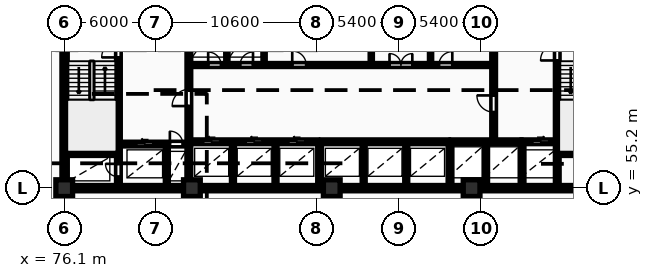
"""IFC4 building model, lengths in metres.
Left out: names, types, materials, properties, quantities, classifications, styles, units other than length and angle.
Written with IfcOpenShell. Run it as: python <this file> out.ifc"""

import sys

from ifc_helpers import new_model, si_unit, direction, frame, frame_2d, origin, origin_2d, place, context, subcontext, project, spatial, rectangle, extrude, element, fill, save


model = new_model("IFC4")
c1 = context("Model", 3, precision=1e-05, world=origin(), true_north=direction((0.0, 1.0)))
c2 = subcontext(c1, "Body", "Model", "MODEL_VIEW")
j1 = project(units=[si_unit("LENGTHUNIT", "METRE"), si_unit("PLANEANGLEUNIT", "RADIAN")], contexts=[c1])
p1 = place(None, origin())
s1 = spatial("IfcSite", under=j1, at=p1, CompositionType="ELEMENT")
p2 = place(p1, origin())
s2 = spatial("IfcBuilding", under=s1, at=p2, CompositionType="ELEMENT")
p3 = place(p2, frame((0.0, 0.0, -3.6)))
s3 = spatial("IfcBuildingStorey", under=s2, at=p3, CompositionType="ELEMENT", Elevation=-3.6)
for number, where, z_axis, x_axis in (
    (1, (76.1, 55.2, 0.0), (0.0, 0.0, 1.0), (1.0, 0.0, 0.0)),
    (2, (84.5, 55.2, 0.0), (0.0, 0.0, 1.0), (1.0, 0.0, 0.0)),
    (3, (93.7, 55.2, 0.0), (0.0, 0.0, 1.0), (1.0, 0.0, 0.0)),
    (4, (102.9, 55.2, 0.0), (0.0, 0.0, 1.0), (1.0, 0.0, 0.0)),
):
    element("IfcColumn", number, at=place(p3, frame(where, z_axis=z_axis, x_axis=x_axis)), inside=s3, PredefinedType="COLUMN", context=c2, shape_type="SweptSolid", body=[
        extrude(rectangle(XDim=1.1, YDim=1.1, at=origin_2d()), origin(), (0.0, 0.0, 1.0), 3.6),
    ])
p4 = place(p3, frame((75.95, 55.2, 0.0), z_axis=(0.0, 0.0, 1.0), x_axis=(1.0, 0.0, 0.0)))
e5 = element("IfcWall", 5, at=p4, inside=s3, PredefinedType="SHEAR", context=c2, shape_type="SweptSolid", body=[
    extrude(rectangle(XDim=36.3, YDim=0.35, at=frame_2d((18.15, 0.0))), origin(), (0.0, 0.0, 1.0), 3.6),
])
p5 = place(p3, frame((76.125, 55.375, 0.0), z_axis=(0.0, 0.0, 1.0), x_axis=(0.0, 1.0, 0.0)))
e6 = element("IfcWall", 6, at=p5, inside=s3, PredefinedType="SHEAR", context=c2, shape_type="SweptSolid", body=[
    extrude(rectangle(XDim=11.65, YDim=0.35, at=frame_2d((5.825, 0.0))), origin(), (0.0, 0.0, 1.0), 3.6),
])
p6 = place(p3, frame((79.665, 55.4, 0.0), z_axis=(0.0, 0.0, 1.0), x_axis=(0.0, 1.0, 0.0)))
e7 = element("IfcWall", 7, at=p6, inside=s3, PredefinedType="SHEAR", context=c2, shape_type="SweptSolid", body=[
    extrude(rectangle(XDim=11.6, YDim=0.25, at=frame_2d((5.8, 0.0))), origin(), (0.0, 0.0, 1.0), 3.6),
])
p7 = place(p6, frame((0.55, 0.0, 0.0)))
e8 = element("IfcOpeningElement", 8, at=p7, cuts=e7, PredefinedType="OPENING", context=c2, shape_type="SweptSolid", body=[
    extrude(rectangle(XDim=0.85, YDim=2.05, at=frame_2d((0.425, 1.025))), frame((0.0, 0.135, 0.0), z_axis=(0.0, -1.0, 0.0), x_axis=(1.0, 0.0, 0.0)), (0.0, 0.0, 1.0), 0.27),
])
p8 = place(p6, frame((8.4, 0.0, 0.0)))
e9 = element("IfcOpeningElement", 9, at=p8, cuts=e7, PredefinedType="OPENING", context=c2, shape_type="SweptSolid", body=[
    extrude(rectangle(XDim=1.1, YDim=2.1, at=frame_2d((0.55, 1.05))), frame((0.0, 0.135, 0.0), z_axis=(0.0, -1.0, 0.0), x_axis=(1.0, 0.0, 0.0)), (0.0, 0.0, 1.0), 0.27),
])
p9 = place(p6, frame((10.25, 0.0, 0.0)))
e10 = element("IfcOpeningElement", 10, at=p9, cuts=e7, PredefinedType="OPENING", context=c2, shape_type="SweptSolid", body=[
    extrude(rectangle(XDim=0.85, YDim=2.05, at=frame_2d((0.425, 1.025))), frame((0.0, 0.135, 0.0), z_axis=(0.0, -1.0, 0.0), x_axis=(1.0, 0.0, 0.0)), (0.0, 0.0, 1.0), 0.27),
])
p10 = place(p3, frame((76.3, 57.475, 0.0), z_axis=(0.0, 0.0, 1.0), x_axis=(1.0, 0.0, 0.0)))
e11 = element("IfcWall", 11, at=p10, inside=s3, PredefinedType="SHEAR", context=c2, shape_type="SweptSolid", body=[
    extrude(rectangle(XDim=3.24, YDim=0.25, at=frame_2d((1.62, 0.0))), origin(), (0.0, 0.0, 1.0), 3.6),
])
p11 = place(p3, frame((79.79, 58.1, 0.0), z_axis=(0.0, 0.0, 1.0), x_axis=(1.0, 0.0, 0.0)))
e12 = element("IfcWall", 12, at=p11, inside=s3, PredefinedType="SHEAR", context=c2, shape_type="SweptSolid", body=[
    extrude(rectangle(XDim=4.39, YDim=0.25, at=frame_2d((2.195, 0.0))), origin(), (0.0, 0.0, 1.0), 3.6),
])
p12 = place(p11, frame((1.05, 0.0, 0.0)))
e13 = element("IfcOpeningElement", 13, at=p12, cuts=e12, PredefinedType="OPENING", context=c2, shape_type="SweptSolid", body=[
    extrude(rectangle(XDim=1.12, YDim=2.12, at=frame_2d((0.56, 1.06))), frame((0.0, 0.135, 0.0), z_axis=(0.0, -1.0, 0.0), x_axis=(1.0, 0.0, 0.0)), (0.0, 0.0, 1.0), 0.27),
])
p13 = place(p11, frame((3.26, 0.0, 0.0)))
e14 = element("IfcOpeningElement", 14, at=p13, cuts=e12, PredefinedType="OPENING", context=c2, shape_type="SweptSolid", body=[
    extrude(rectangle(XDim=0.85, YDim=2.05, at=frame_2d((0.425, 1.025))), frame((0.0, 0.135, 0.0), z_axis=(0.0, -1.0, 0.0), x_axis=(1.0, 0.0, 0.0)), (0.0, 0.0, 1.0), 0.27),
])
p14 = place(p3, frame((82.85, 55.4, 0.0), z_axis=(0.0, 0.0, 1.0), x_axis=(0.0, 1.0, 0.0)))
e15 = element("IfcWall", 15, at=p14, inside=s3, PredefinedType="PARTITIONING", context=c2, shape_type="SweptSolid", body=[
    extrude(rectangle(XDim=2.56, YDim=0.2, at=frame_2d((1.28, 0.0))), origin(), (0.0, 0.0, 1.0), 3.3),
])
p15 = place(p3, frame((84.3, 55.4, 0.0), z_axis=(0.0, 0.0, 1.0), x_axis=(0.0, 1.0, 0.0)))
e16 = element("IfcWall", 16, at=p15, inside=s3, PredefinedType="SHEAR", context=c2, shape_type="SweptSolid", body=[
    extrude(rectangle(XDim=11.6, YDim=0.25, at=frame_2d((5.8, 0.0))), origin(), (0.0, 0.0, 1.0), 3.6),
])
p16 = place(p15, frame((5.2, 0.0, 0.0)))
e17 = element("IfcOpeningElement", 17, at=p16, cuts=e16, PredefinedType="OPENING", context=c2, shape_type="SweptSolid", body=[
    extrude(rectangle(XDim=1.1, YDim=2.1, at=frame_2d((0.55, 1.05))), frame((0.0, 0.135, 0.0), z_axis=(0.0, -1.0, 0.0), x_axis=(1.0, 0.0, 0.0)), (0.0, 0.0, 1.0), 0.27),
])
for number, where, z_axis, x_axis in (
    (18, (87.2, 55.4, 0.0), (0.0, 0.0, 1.0), (0.0, 1.0, 0.0)),
    (19, (90.0, 55.4, 0.0), (0.0, 0.0, 1.0), (0.0, 1.0, 0.0)),
):
    element("IfcWall", number, at=place(p3, frame(where, z_axis=z_axis, x_axis=x_axis)), inside=s3, PredefinedType="PARTITIONING", context=c2, shape_type="SweptSolid", body=[
        extrude(rectangle(XDim=2.72, YDim=0.2, at=frame_2d((1.36, 0.0))), origin(), (0.0, 0.0, 1.0), 3.3),
    ])
p17 = place(p3, frame((84.42, 58.25, 0.0), z_axis=(0.0, 0.0, 1.0), x_axis=(1.0, 0.0, 0.0)))
e20 = element("IfcWall", 20, at=p17, inside=s3, PredefinedType="SHEAR", context=c2, shape_type="SweptSolid", body=[
    extrude(rectangle(XDim=8.36, YDim=0.25, at=frame_2d((4.18, 0.0))), origin(), (0.0, 0.0, 1.0), 3.6),
])
p18 = place(p17, frame((0.82, 0.0, 0.0)))
e21 = element("IfcOpeningElement", 21, at=p18, cuts=e20, PredefinedType="OPENING", context=c2, shape_type="SweptSolid", body=[
    extrude(rectangle(XDim=1.12, YDim=2.12, at=frame_2d((0.56, 1.06))), frame((0.0, 0.135, 0.0), z_axis=(0.0, -1.0, 0.0), x_axis=(1.0, 0.0, 0.0)), (0.0, 0.0, 1.0), 0.27),
])
p19 = place(p17, frame((3.62, 0.0, 0.0)))
e22 = element("IfcOpeningElement", 22, at=p19, cuts=e20, PredefinedType="OPENING", context=c2, shape_type="SweptSolid", body=[
    extrude(rectangle(XDim=1.12, YDim=2.12, at=frame_2d((0.56, 1.06))), frame((0.0, 0.135, 0.0), z_axis=(0.0, -1.0, 0.0), x_axis=(1.0, 0.0, 0.0)), (0.0, 0.0, 1.0), 0.27),
])
p20 = place(p17, frame((6.42, 0.0, 0.0)))
e23 = element("IfcOpeningElement", 23, at=p20, cuts=e20, PredefinedType="OPENING", context=c2, shape_type="SweptSolid", body=[
    extrude(rectangle(XDim=1.12, YDim=2.12, at=frame_2d((0.56, 1.06))), frame((0.0, 0.135, 0.0), z_axis=(0.0, -1.0, 0.0), x_axis=(1.0, 0.0, 0.0)), (0.0, 0.0, 1.0), 0.27),
])
p21 = place(p3, frame((92.9, 55.4, 0.0), z_axis=(0.0, 0.0, 1.0), x_axis=(0.0, 1.0, 0.0)))
e24 = element("IfcWall", 24, at=p21, inside=s3, PredefinedType="SHEAR", context=c2, shape_type="SweptSolid", body=[
    extrude(rectangle(XDim=2.85, YDim=0.25, at=frame_2d((1.425, 0.0))), origin(), (0.0, 0.0, 1.0), 3.6),
])
for number, where, z_axis, x_axis in (
    (25, (95.8, 55.4, 0.0), (0.0, 0.0, 1.0), (0.0, 1.0, 0.0)),
    (26, (98.6, 55.4, 0.0), (0.0, 0.0, 1.0), (0.0, 1.0, 0.0)),
):
    element("IfcWall", number, at=place(p3, frame(where, z_axis=z_axis, x_axis=x_axis)), inside=s3, PredefinedType="PARTITIONING", context=c2, shape_type="SweptSolid", body=[
        extrude(rectangle(XDim=2.72, YDim=0.2, at=frame_2d((1.36, 0.0))), origin(), (0.0, 0.0, 1.0), 3.3),
    ])
p22 = place(p3, frame((93.02, 58.25, 0.0), z_axis=(0.0, 0.0, 1.0), x_axis=(1.0, 0.0, 0.0)))
e27 = element("IfcWall", 27, at=p22, inside=s3, PredefinedType="SHEAR", context=c2, shape_type="SweptSolid", body=[
    extrude(rectangle(XDim=8.36, YDim=0.25, at=frame_2d((4.18, 0.0))), origin(), (0.0, 0.0, 1.0), 3.6),
])
p23 = place(p3, frame((101.48, 55.4, 0.0), z_axis=(0.0, 0.0, 1.0), x_axis=(0.0, 1.0, 0.0)))
e28 = element("IfcWall", 28, at=p23, inside=s3, PredefinedType="SHEAR", context=c2, shape_type="SweptSolid", body=[
    extrude(rectangle(XDim=2.85, YDim=0.25, at=frame_2d((1.425, 0.0))), origin(), (0.0, 0.0, 1.0), 3.6),
])
p24 = place(p3, frame((103.85, 55.4, 0.0), z_axis=(0.0, 0.0, 1.0), x_axis=(0.0, 1.0, 0.0)))
e29 = element("IfcWall", 29, at=p24, inside=s3, PredefinedType="PARTITIONING", context=c2, shape_type="SweptSolid", body=[
    extrude(rectangle(XDim=2.72, YDim=0.2, at=frame_2d((1.36, 0.0))), origin(), (0.0, 0.0, 1.0), 3.3),
])
p25 = place(p3, frame((101.55, 58.25, 0.0), z_axis=(0.0, 0.0, 1.0), x_axis=(1.0, 0.0, 0.0)))
e30 = element("IfcWall", 30, at=p25, inside=s3, PredefinedType="SHEAR", context=c2, shape_type="SweptSolid", body=[
    extrude(rectangle(XDim=4.6, YDim=0.25, at=frame_2d((2.3, 0.0))), origin(), (0.0, 0.0, 1.0), 3.6),
])
p26 = place(p3, frame((106.22, 55.4, 0.0), z_axis=(0.0, 0.0, 1.0), x_axis=(0.0, 1.0, 0.0)))
e31 = element("IfcWall", 31, at=p26, inside=s3, PredefinedType="SHEAR", context=c2, shape_type="SweptSolid", body=[
    extrude(rectangle(XDim=2.85, YDim=0.25, at=frame_2d((1.425, 0.0))), origin(), (0.0, 0.0, 1.0), 3.6),
])
p27 = place(p3, frame((106.22, 58.25, 0.0), z_axis=(0.0, 0.0, 1.0), x_axis=(1.0, 0.0, 0.0)))
e32 = element("IfcWall", 32, at=p27, inside=s3, PredefinedType="SHEAR", context=c2, shape_type="SweptSolid", body=[
    extrude(rectangle(XDim=2.46, YDim=0.25, at=frame_2d((1.23, 0.0))), origin(), (0.0, 0.0, 1.0), 3.6),
])
p28 = place(p27, frame((0.67, 0.0, 0.0)))
e33 = element("IfcOpeningElement", 33, at=p28, cuts=e32, PredefinedType="OPENING", context=c2, shape_type="SweptSolid", body=[
    extrude(rectangle(XDim=1.12, YDim=2.12, at=frame_2d((0.56, 1.06))), frame((0.0, 0.135, 0.0), z_axis=(0.0, -1.0, 0.0), x_axis=(1.0, 0.0, 0.0)), (0.0, 0.0, 1.0), 0.27),
])
for number, where, z_axis, x_axis in (
    (34, (86.8, 63.4, 0.0), (0.0, 0.0, 1.0), (0.0, 1.0, 0.0)),
    (35, (89.25, 63.4, 0.0), (0.0, 0.0, 1.0), (0.0, 1.0, 0.0)),
    (36, (96.3, 63.4, 0.0), (0.0, 0.0, 1.0), (0.0, 1.0, 0.0)),
    (37, (100.2, 63.4, 0.0), (0.0, 0.0, 1.0), (0.0, 1.0, 0.0)),
):
    element("IfcWall", number, at=place(p3, frame(where, z_axis=z_axis, x_axis=x_axis)), inside=s3, PredefinedType="PARTITIONING", context=c2, shape_type="SweptSolid", body=[
        extrude(rectangle(XDim=3.6, YDim=0.15, at=frame_2d((1.8, 0.0))), origin(), (0.0, 0.0, 1.0), 3.3),
    ])
p29 = place(p3, frame((84.42, 63.3, 0.0), z_axis=(0.0, 0.0, 1.0), x_axis=(1.0, 0.0, 0.0)))
e38 = element("IfcWall", 38, at=p29, inside=s3, PredefinedType="PARTITIONING", context=c2, shape_type="SweptSolid", body=[
    extrude(rectangle(XDim=19.83, YDim=0.2, at=frame_2d((9.915, 0.0))), origin(), (0.0, 0.0, 1.0), 3.3),
])
p30 = place(p29, frame((1.15, 0.0, 0.0)))
e39 = element("IfcOpeningElement", 39, at=p30, cuts=e38, PredefinedType="OPENING", context=c2, shape_type="SweptSolid", body=[
    extrude(rectangle(XDim=0.85, YDim=2.05, at=frame_2d((0.425, 1.025))), frame((0.0, 0.11, 0.0), z_axis=(0.0, -1.0, 0.0), x_axis=(1.0, 0.0, 0.0)), (0.0, 0.0, 1.0), 0.22),
])
p31 = place(p29, frame((3.25, 0.0, 0.0)))
e40 = element("IfcOpeningElement", 40, at=p31, cuts=e38, PredefinedType="OPENING", context=c2, shape_type="SweptSolid", body=[
    extrude(rectangle(XDim=0.85, YDim=2.05, at=frame_2d((0.425, 1.025))), frame((0.0, 0.11, 0.0), z_axis=(0.0, -1.0, 0.0), x_axis=(1.0, 0.0, 0.0)), (0.0, 0.0, 1.0), 0.22),
])
p32 = place(p29, frame((13.08, 0.0, 0.0)))
e41 = element("IfcOpeningElement", 41, at=p32, cuts=e38, PredefinedType="OPENING", context=c2, shape_type="SweptSolid", body=[
    extrude(rectangle(XDim=1.5, YDim=2.2, at=frame_2d((0.75, 1.1))), frame((0.0, 0.11, 0.0), z_axis=(0.0, -1.0, 0.0), x_axis=(1.0, 0.0, 0.0)), (0.0, 0.0, 1.0), 0.22),
])
p33 = place(p29, frame((6.68, 0.0, 0.0)))
e42 = element("IfcOpeningElement", 42, at=p33, cuts=e38, PredefinedType="OPENING", context=c2, shape_type="SweptSolid", body=[
    extrude(rectangle(XDim=0.92, YDim=2.08, at=frame_2d((0.46, 1.04))), frame((0.0, 0.11, 0.0), z_axis=(0.0, -1.0, 0.0), x_axis=(1.0, 0.0, 0.0)), (0.0, 0.0, 1.0), 0.22),
])
p34 = place(p29, frame((16.33, 0.0, 0.0)))
e43 = element("IfcOpeningElement", 43, at=p34, cuts=e38, PredefinedType="OPENING", context=c2, shape_type="SweptSolid", body=[
    extrude(rectangle(XDim=0.88, YDim=2.06, at=frame_2d((0.44, 1.03))), frame((0.0, 0.11, 0.0), z_axis=(0.0, -1.0, 0.0), x_axis=(1.0, 0.0, 0.0)), (0.0, 0.0, 1.0), 0.22),
])
p35 = place(p3, frame((104.35, 58.4, 0.0), z_axis=(0.0, 0.0, 1.0), x_axis=(0.0, 1.0, 0.0)))
e44 = element("IfcWall", 44, at=p35, inside=s3, PredefinedType="SHEAR", context=c2, shape_type="SweptSolid", body=[
    extrude(rectangle(XDim=8.6, YDim=0.25, at=frame_2d((4.3, 0.0))), origin(), (0.0, 0.0, 1.0), 3.6),
])
p36 = place(p35, frame((1.8, 0.0, 0.0)))
e45 = element("IfcOpeningElement", 45, at=p36, cuts=e44, PredefinedType="OPENING", context=c2, shape_type="SweptSolid", body=[
    extrude(rectangle(XDim=1.1, YDim=2.1, at=frame_2d((0.55, 1.05))), frame((0.0, 0.135, 0.0), z_axis=(0.0, -1.0, 0.0), x_axis=(1.0, 0.0, 0.0)), (0.0, 0.0, 1.0), 0.27),
])
p37 = place(p3, frame((108.535, 55.4, 0.0), z_axis=(0.0, 0.0, 1.0), x_axis=(0.0, 1.0, 0.0)))
e46 = element("IfcWall", 46, at=p37, inside=s3, PredefinedType="SHEAR", context=c2, shape_type="SweptSolid", body=[
    extrude(rectangle(XDim=11.6, YDim=0.25, at=frame_2d((5.8, 0.0))), origin(), (0.0, 0.0, 1.0), 3.6),
])
p38 = place(p37, frame((8.2, 0.0, 0.0)))
e47 = element("IfcOpeningElement", 47, at=p38, cuts=e46, PredefinedType="OPENING", context=c2, shape_type="SweptSolid", body=[
    extrude(rectangle(XDim=1.1, YDim=2.1, at=frame_2d((0.55, 1.05))), frame((0.0, 0.135, 0.0), z_axis=(0.0, -1.0, 0.0), x_axis=(1.0, 0.0, 0.0)), (0.0, 0.0, 1.0), 0.27),
])
p39 = place(p37, frame((10.25, 0.0, 0.0)))
e48 = element("IfcOpeningElement", 48, at=p39, cuts=e46, PredefinedType="OPENING", context=c2, shape_type="SweptSolid", body=[
    extrude(rectangle(XDim=0.85, YDim=2.05, at=frame_2d((0.425, 1.025))), frame((0.0, 0.135, 0.0), z_axis=(0.0, -1.0, 0.0), x_axis=(1.0, 0.0, 0.0)), (0.0, 0.0, 1.0), 0.27),
])
p40 = place(p3, frame((108.66, 57.475, 0.0), z_axis=(0.0, 0.0, 1.0), x_axis=(1.0, 0.0, 0.0)))
e49 = element("IfcWall", 49, at=p40, inside=s3, PredefinedType="SHEAR", context=c2, shape_type="SweptSolid", body=[
    extrude(rectangle(XDim=3.24, YDim=0.25, at=frame_2d((1.62, 0.0))), origin(), (0.0, 0.0, 1.0), 3.6),
])
p41 = place(p7, origin())
e50 = element("IfcDoor", 50, at=p41, inside=s3, OperationType="SINGLE_SWING_RIGHT", PredefinedType="DOOR", context=c2, shape_type="SweptSolid", body=[
    extrude(rectangle(XDim=0.85, YDim=2.05, at=frame_2d((0.425, 1.025))), frame((0.0, 0.025, 0.0), z_axis=(0.0, -1.0, 0.0), x_axis=(1.0, 0.0, 0.0)), (0.0, 0.0, 1.0), 0.05),
])
fill(e8, e50)
p42 = place(p8, origin())
e51 = element("IfcDoor", 51, at=p42, inside=s3, OperationType="SINGLE_SWING_LEFT", PredefinedType="DOOR", context=c2, shape_type="SweptSolid", body=[
    extrude(rectangle(XDim=1.1, YDim=2.1, at=frame_2d((0.55, 1.05))), frame((0.0, 0.025, 0.0), z_axis=(0.0, -1.0, 0.0), x_axis=(1.0, 0.0, 0.0)), (0.0, 0.0, 1.0), 0.05),
])
fill(e9, e51)
p43 = place(p12, origin())
e52 = element("IfcDoor", 52, at=p43, inside=s3, OperationType="SLIDING_TO_LEFT", PredefinedType="DOOR", context=c2, shape_type="SweptSolid", body=[
    extrude(rectangle(XDim=1.12, YDim=2.12, at=frame_2d((0.56, 1.06))), frame((0.0, 0.025, 0.0), z_axis=(0.0, -1.0, 0.0), x_axis=(1.0, 0.0, 0.0)), (0.0, 0.0, 1.0), 0.05),
])
fill(e13, e52)
p44 = place(p13, origin())
e53 = element("IfcDoor", 53, at=p44, inside=s3, OperationType="SINGLE_SWING_LEFT", PredefinedType="DOOR", context=c2, shape_type="SweptSolid", body=[
    extrude(rectangle(XDim=0.85, YDim=2.05, at=frame_2d((0.425, 1.025))), frame((0.0, 0.025, 0.0), z_axis=(0.0, -1.0, 0.0), x_axis=(1.0, 0.0, 0.0)), (0.0, 0.0, 1.0), 0.05),
])
fill(e14, e53)
p45 = place(p16, origin())
e54 = element("IfcDoor", 54, at=p45, inside=s3, OperationType="SINGLE_SWING_LEFT", PredefinedType="DOOR", context=c2, shape_type="SweptSolid", body=[
    extrude(rectangle(XDim=1.1, YDim=2.1, at=frame_2d((0.55, 1.05))), frame((0.0, 0.025, 0.0), z_axis=(0.0, -1.0, 0.0), x_axis=(1.0, 0.0, 0.0)), (0.0, 0.0, 1.0), 0.05),
])
fill(e17, e54)
p46 = place(p18, origin())
e55 = element("IfcDoor", 55, at=p46, inside=s3, OperationType="SLIDING_TO_LEFT", PredefinedType="DOOR", context=c2, shape_type="SweptSolid", body=[
    extrude(rectangle(XDim=1.12, YDim=2.12, at=frame_2d((0.56, 1.06))), frame((0.0, 0.025, 0.0), z_axis=(0.0, -1.0, 0.0), x_axis=(1.0, 0.0, 0.0)), (0.0, 0.0, 1.0), 0.05),
])
fill(e21, e55)
p47 = place(p19, origin())
e56 = element("IfcDoor", 56, at=p47, inside=s3, OperationType="SLIDING_TO_LEFT", PredefinedType="DOOR", context=c2, shape_type="SweptSolid", body=[
    extrude(rectangle(XDim=1.12, YDim=2.12, at=frame_2d((0.56, 1.06))), frame((0.0, 0.025, 0.0), z_axis=(0.0, -1.0, 0.0), x_axis=(1.0, 0.0, 0.0)), (0.0, 0.0, 1.0), 0.05),
])
fill(e22, e56)
p48 = place(p20, origin())
e57 = element("IfcDoor", 57, at=p48, inside=s3, OperationType="SLIDING_TO_LEFT", PredefinedType="DOOR", context=c2, shape_type="SweptSolid", body=[
    extrude(rectangle(XDim=1.12, YDim=2.12, at=frame_2d((0.56, 1.06))), frame((0.0, 0.025, 0.0), z_axis=(0.0, -1.0, 0.0), x_axis=(1.0, 0.0, 0.0)), (0.0, 0.0, 1.0), 0.05),
])
fill(e23, e57)
p49 = place(p28, origin())
e58 = element("IfcDoor", 58, at=p49, inside=s3, OperationType="SLIDING_TO_RIGHT", PredefinedType="DOOR", context=c2, shape_type="SweptSolid", body=[
    extrude(rectangle(XDim=1.12, YDim=2.12, at=frame_2d((0.56, 1.06))), frame((0.0, 0.025, 0.0), z_axis=(0.0, -1.0, 0.0), x_axis=(1.0, 0.0, 0.0)), (0.0, 0.0, 1.0), 0.05),
])
fill(e33, e58)
p50 = place(p30, origin())
e59 = element("IfcDoor", 59, at=p50, inside=s3, OperationType="SINGLE_SWING_LEFT", PredefinedType="DOOR", context=c2, shape_type="SweptSolid", body=[
    extrude(rectangle(XDim=0.85, YDim=2.05, at=frame_2d((0.425, 1.025))), frame((0.0, 0.025, 0.0), z_axis=(0.0, -1.0, 0.0), x_axis=(1.0, 0.0, 0.0)), (0.0, 0.0, 1.0), 0.05),
])
fill(e39, e59)
p51 = place(p31, origin())
e60 = element("IfcDoor", 60, at=p51, inside=s3, OperationType="SINGLE_SWING_RIGHT", PredefinedType="DOOR", context=c2, shape_type="SweptSolid", body=[
    extrude(rectangle(XDim=0.85, YDim=2.05, at=frame_2d((0.425, 1.025))), frame((0.0, 0.025, 0.0), z_axis=(0.0, -1.0, 0.0), x_axis=(1.0, 0.0, 0.0)), (0.0, 0.0, 1.0), 0.05),
])
fill(e40, e60)
p52 = place(p32, origin())
e61 = element("IfcDoor", 61, at=p52, inside=s3, OperationType="DOUBLE_DOOR_SINGLE_SWING", PredefinedType="DOOR", context=c2, shape_type="SweptSolid", body=[
    extrude(rectangle(XDim=1.5, YDim=2.2, at=frame_2d((0.75, 1.1))), frame((0.0, 0.025, 0.0), z_axis=(0.0, -1.0, 0.0), x_axis=(1.0, 0.0, 0.0)), (0.0, 0.0, 1.0), 0.05),
])
fill(e41, e61)
p53 = place(p33, origin())
e62 = element("IfcDoor", 62, at=p53, inside=s3, OperationType="SINGLE_SWING_LEFT", PredefinedType="DOOR", context=c2, shape_type="SweptSolid", body=[
    extrude(rectangle(XDim=0.92, YDim=2.08, at=frame_2d((0.46, 1.04))), frame((0.0, 0.025, 0.0), z_axis=(0.0, -1.0, 0.0), x_axis=(1.0, 0.0, 0.0)), (0.0, 0.0, 1.0), 0.05),
])
fill(e42, e62)
p54 = place(p34, origin())
e63 = element("IfcDoor", 63, at=p54, inside=s3, OperationType="SINGLE_SWING_RIGHT", PredefinedType="DOOR", context=c2, shape_type="SweptSolid", body=[
    extrude(rectangle(XDim=0.88, YDim=2.06, at=frame_2d((0.44, 1.03))), frame((0.0, 0.025, 0.0), z_axis=(0.0, -1.0, 0.0), x_axis=(1.0, 0.0, 0.0)), (0.0, 0.0, 1.0), 0.05),
])
fill(e43, e63)
p55 = place(p36, origin())
e64 = element("IfcDoor", 64, at=p55, inside=s3, OperationType="SINGLE_SWING_RIGHT", PredefinedType="DOOR", context=c2, shape_type="SweptSolid", body=[
    extrude(rectangle(XDim=1.1, YDim=2.1, at=frame_2d((0.55, 1.05))), frame((0.0, 0.025, 0.0), z_axis=(0.0, -1.0, 0.0), x_axis=(1.0, 0.0, 0.0)), (0.0, 0.0, 1.0), 0.05),
])
fill(e45, e64)
p56 = place(p38, origin())
e65 = element("IfcDoor", 65, at=p56, inside=s3, OperationType="SINGLE_SWING_LEFT", PredefinedType="DOOR", context=c2, shape_type="SweptSolid", body=[
    extrude(rectangle(XDim=1.1, YDim=2.1, at=frame_2d((0.55, 1.05))), frame((0.0, 0.025, 0.0), z_axis=(0.0, -1.0, 0.0), x_axis=(1.0, 0.0, 0.0)), (0.0, 0.0, 1.0), 0.05),
])
fill(e47, e65)
save(model, sys.argv[1])
